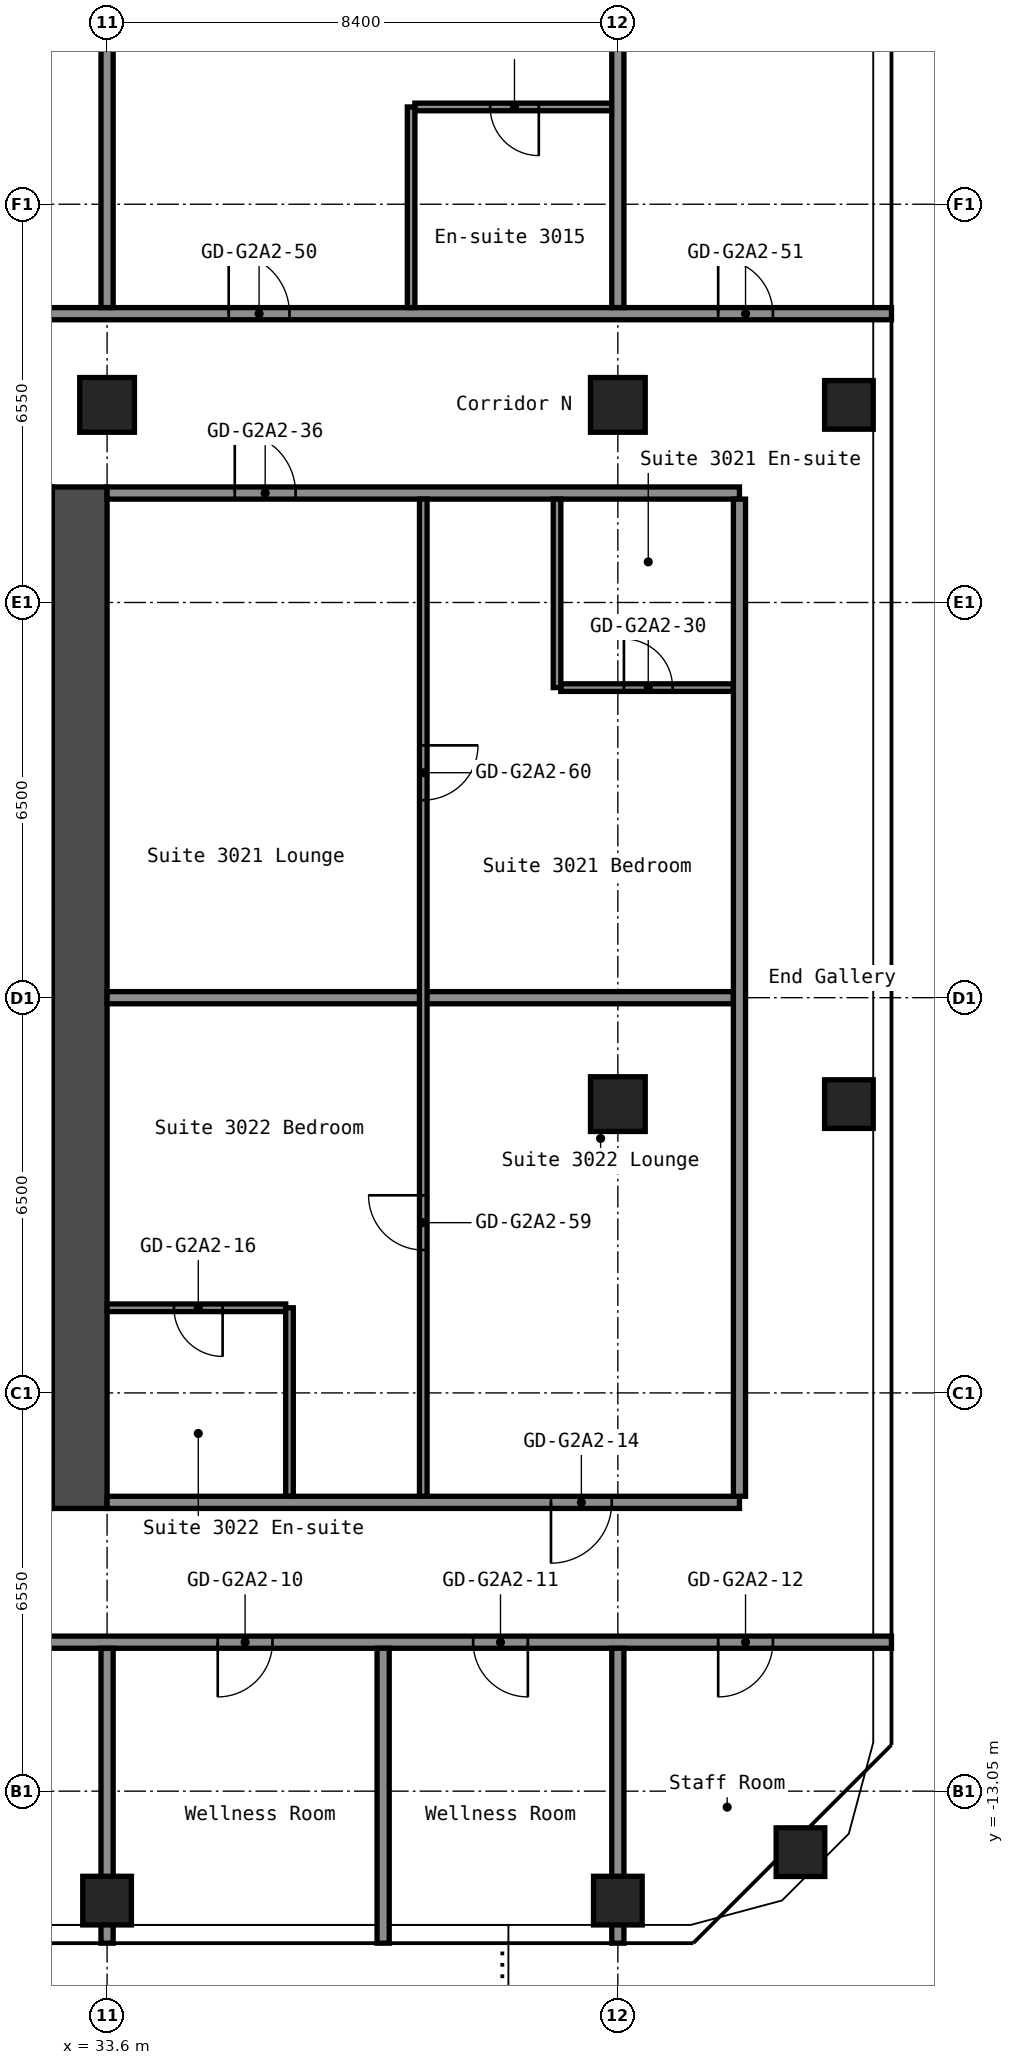
"""IFC4 building model, lengths in metres.
Left out: names, types, materials, properties, quantities, classifications, styles, units other than length and angle.
Written with IfcOpenShell. Run it as: python <this file> out.ifc"""

import sys

from ifc_helpers import new_model, si_unit, direction, frame, frame_2d, origin, origin_2d, place, context, subcontext, project, spatial, rectangle, hollow_rectangle, extrude, element, fill, save


model = new_model("IFC4")
c1 = context("Model", 3, precision=1e-05, world=origin(), true_north=direction((0.0, 1.0)))
c2 = subcontext(c1, "Body", "Model", "MODEL_VIEW")
j1 = project(units=[si_unit("LENGTHUNIT", "METRE"), si_unit("PLANEANGLEUNIT", "RADIAN")], contexts=[c1])
p1 = place(None, origin())
s1 = spatial("IfcSite", under=j1, at=p1, CompositionType="ELEMENT")
p2 = place(p1, origin())
s2 = spatial("IfcBuilding", under=s1, at=p2, CompositionType="ELEMENT")
p3 = place(p2, frame((0.0, 0.0, 107.4)))
s3 = spatial("IfcBuildingStorey", under=s2, at=p3, CompositionType="ELEMENT", Elevation=107.4)
p4 = place(p3, frame((33.6, -14.85, 0.0), z_axis=(0.0, 0.0, 1.0), x_axis=(1.0, 0.0, 0.0)))
e1 = element("IfcColumn", 1, at=p4, inside=s3, PredefinedType="COLUMN", context=c2, shape_type="SweptSolid", body=[
    extrude(hollow_rectangle(XDim=0.8, YDim=0.8, WallThickness=0.032, at=origin_2d()), origin(), (0.0, 0.0, 1.0), 2.8),
])
p5 = place(p3, frame((33.6, 9.75, 0.0), z_axis=(0.0, 0.0, 1.0), x_axis=(1.0, 0.0, 0.0)))
e2 = element("IfcColumn", 2, at=p5, inside=s3, PredefinedType="COLUMN", context=c2, shape_type="SweptSolid", body=[
    extrude(hollow_rectangle(XDim=0.9, YDim=0.9, WallThickness=0.036, at=origin_2d()), origin(), (0.0, 0.0, 1.0), 2.8),
])
p6 = place(p3, frame((42.0, -14.85, 0.0), z_axis=(0.0, 0.0, 1.0), x_axis=(1.0, 0.0, 0.0)))
e3 = element("IfcColumn", 3, at=p6, inside=s3, PredefinedType="COLUMN", context=c2, shape_type="SweptSolid", body=[
    extrude(hollow_rectangle(XDim=0.8, YDim=0.8, WallThickness=0.032, at=origin_2d()), origin(), (0.0, 0.0, 1.0), 2.8),
])
for number, where, z_axis, x_axis in (
    (4, (42.0, -1.75, 0.0), (0.0, 0.0, 1.0), (1.0, 0.0, 0.0)),
    (5, (42.0, 9.75, 0.0), (0.0, 0.0, 1.0), (1.0, 0.0, 0.0)),
):
    element("IfcColumn", number, at=place(p3, frame(where, z_axis=z_axis, x_axis=x_axis)), inside=s3, PredefinedType="COLUMN", context=c2, shape_type="SweptSolid", body=[
        extrude(hollow_rectangle(XDim=0.9, YDim=0.9, WallThickness=0.036, at=origin_2d()), origin(), (0.0, 0.0, 1.0), 2.8),
    ])
for number, where, z_axis, x_axis in (
    (6, (45.003, -14.053, 0.0), (0.0, 0.0, 1.0), (1.0, 0.0, 0.0)),
    (7, (45.8, -1.75, 0.0), (0.0, 0.0, 1.0), (1.0, 0.0, 0.0)),
    (8, (45.8, 9.75, 0.0), (0.0, 0.0, 1.0), (1.0, 0.0, 0.0)),
):
    element("IfcColumn", number, at=place(p3, frame(where, z_axis=z_axis, x_axis=x_axis)), inside=s3, PredefinedType="COLUMN", context=c2, shape_type="SweptSolid", body=[
        extrude(hollow_rectangle(XDim=0.8, YDim=0.8, WallThickness=0.032, at=origin_2d()), origin(), (0.0, 0.0, 1.0), 2.8),
    ])
p7 = place(p3, frame((33.15, -8.4, 0.0), z_axis=(0.0, 0.0, 1.0), x_axis=(0.0, 1.0, 0.0)))
e9 = element("IfcWall", 9, at=p7, inside=s3, PredefinedType="SHEAR", context=c2, shape_type="SweptSolid", body=[
    extrude(rectangle(XDim=16.8, YDim=0.9, at=frame_2d((8.4, 0.0))), origin(), (0.0, 0.0, 1.0), 2.8),
])
p8 = place(p3, frame((16.8, -10.6, 0.0), z_axis=(0.0, 0.0, 1.0), x_axis=(1.0, 0.0, 0.0)))
e10 = element("IfcWall", 10, at=p8, inside=s3, PredefinedType="PARTITIONING", context=c2, shape_type="SweptSolid", body=[
    extrude(rectangle(XDim=29.7, YDim=0.2, at=frame_2d((14.85, 0.0))), origin(), (0.0, 0.0, 1.0), 2.8),
])
p9 = place(p8, frame((3.7, 0.0, 0.0)))
e11 = element("IfcOpeningElement", 11, at=p9, cuts=e10, PredefinedType="OPENING", context=c2, shape_type="SweptSolid", body=[
    extrude(rectangle(XDim=1.0, YDim=2.1, at=frame_2d((0.5, 1.05))), frame((0.0, 0.11, 0.0), z_axis=(0.0, -1.0, 0.0), x_axis=(1.0, 0.0, 0.0)), (0.0, 0.0, 1.0), 0.22),
])
p10 = place(p8, frame((9.545, 0.0, 0.0)))
e12 = element("IfcOpeningElement", 12, at=p10, cuts=e10, PredefinedType="OPENING", context=c2, shape_type="SweptSolid", body=[
    extrude(rectangle(XDim=0.9, YDim=2.1, at=frame_2d((0.45, 1.05))), frame((0.0, 0.11, 0.0), z_axis=(0.0, -1.0, 0.0), x_axis=(1.0, 0.0, 0.0)), (0.0, 0.0, 1.0), 0.22),
])
p11 = place(p8, frame((13.745, 0.0, 0.0)))
e13 = element("IfcOpeningElement", 13, at=p11, cuts=e10, PredefinedType="OPENING", context=c2, shape_type="SweptSolid", body=[
    extrude(rectangle(XDim=0.9, YDim=2.1, at=frame_2d((0.45, 1.05))), frame((0.0, 0.11, 0.0), z_axis=(0.0, -1.0, 0.0), x_axis=(1.0, 0.0, 0.0)), (0.0, 0.0, 1.0), 0.22),
])
p12 = place(p8, frame((18.62, 0.0, 0.0)))
e14 = element("IfcOpeningElement", 14, at=p12, cuts=e10, PredefinedType="OPENING", context=c2, shape_type="SweptSolid", body=[
    extrude(rectangle(XDim=0.9, YDim=2.1, at=frame_2d((0.45, 1.05))), frame((0.0, 0.11, 0.0), z_axis=(0.0, -1.0, 0.0), x_axis=(1.0, 0.0, 0.0)), (0.0, 0.0, 1.0), 0.22),
])
p13 = place(p8, frame((22.82, 0.0, 0.0)))
e15 = element("IfcOpeningElement", 15, at=p13, cuts=e10, PredefinedType="OPENING", context=c2, shape_type="SweptSolid", body=[
    extrude(rectangle(XDim=0.9, YDim=2.1, at=frame_2d((0.45, 1.05))), frame((0.0, 0.11, 0.0), z_axis=(0.0, -1.0, 0.0), x_axis=(1.0, 0.0, 0.0)), (0.0, 0.0, 1.0), 0.22),
])
p14 = place(p8, frame((26.85, 0.0, 0.0)))
e16 = element("IfcOpeningElement", 16, at=p14, cuts=e10, PredefinedType="OPENING", context=c2, shape_type="SweptSolid", body=[
    extrude(rectangle(XDim=0.9, YDim=2.1, at=frame_2d((0.45, 1.05))), frame((0.0, 0.11, 0.0), z_axis=(0.0, -1.0, 0.0), x_axis=(1.0, 0.0, 0.0)), (0.0, 0.0, 1.0), 0.22),
])
p15 = place(p3, frame((33.6, -8.3, 0.0), z_axis=(0.0, 0.0, 1.0), x_axis=(1.0, 0.0, 0.0)))
e17 = element("IfcWall", 17, at=p15, inside=s3, PredefinedType="PARTITIONING", context=c2, shape_type="SweptSolid", body=[
    extrude(rectangle(XDim=10.4, YDim=0.2, at=frame_2d((5.2, 0.0))), origin(), (0.0, 0.0, 1.0), 2.8),
])
p16 = place(p15, frame((7.3, 0.0, 0.0)))
e18 = element("IfcOpeningElement", 18, at=p16, cuts=e17, PredefinedType="OPENING", context=c2, shape_type="SweptSolid", body=[
    extrude(rectangle(XDim=1.0, YDim=2.1, at=frame_2d((0.5, 1.05))), frame((0.0, 0.11, 0.0), z_axis=(0.0, -1.0, 0.0), x_axis=(1.0, 0.0, 0.0)), (0.0, 0.0, 1.0), 0.22),
])
p17 = place(p3, frame((33.6, -5.1, 0.0), z_axis=(0.0, 0.0, 1.0), x_axis=(1.0, 0.0, 0.0)))
e19 = element("IfcWall", 19, at=p17, inside=s3, PredefinedType="PARTITIONING", context=c2, shape_type="SweptSolid", body=[
    extrude(rectangle(XDim=2.938, YDim=0.125, at=frame_2d((1.469, 0.0))), origin(), (0.0, 0.0, 1.0), 2.8),
])
p18 = place(p17, frame((1.1, 0.0, 0.0)))
e20 = element("IfcOpeningElement", 20, at=p18, cuts=e19, PredefinedType="OPENING", context=c2, shape_type="SweptSolid", body=[
    extrude(rectangle(XDim=0.8, YDim=2.1, at=frame_2d((0.4, 1.05))), frame((0.0, 0.073, 0.0), z_axis=(0.0, -1.0, 0.0), x_axis=(1.0, 0.0, 0.0)), (0.0, 0.0, 1.0), 0.145),
])
p19 = place(p3, frame((33.6, 0.0, 0.0), z_axis=(0.0, 0.0, 1.0), x_axis=(1.0, 0.0, 0.0)))
e21 = element("IfcWall", 21, at=p19, inside=s3, PredefinedType="PARTITIONING", context=c2, shape_type="SweptSolid", body=[
    extrude(rectangle(XDim=10.3, YDim=0.2, at=frame_2d((5.15, 0.0))), origin(), (0.0, 0.0, 1.0), 2.8),
])
p20 = place(p3, frame((41.062, 5.1, 0.0), z_axis=(0.0, 0.0, 1.0), x_axis=(1.0, 0.0, 0.0)))
e22 = element("IfcWall", 22, at=p20, inside=s3, PredefinedType="PARTITIONING", context=c2, shape_type="SweptSolid", body=[
    extrude(rectangle(XDim=2.837, YDim=0.125, at=frame_2d((1.419, 0.0))), origin(), (0.0, 0.0, 1.0), 2.8),
])
p21 = place(p20, frame((1.038, 0.0, 0.0)))
e23 = element("IfcOpeningElement", 23, at=p21, cuts=e22, PredefinedType="OPENING", context=c2, shape_type="SweptSolid", body=[
    extrude(rectangle(XDim=0.8, YDim=2.1, at=frame_2d((0.4, 1.05))), frame((0.0, 0.073, 0.0), z_axis=(0.0, -1.0, 0.0), x_axis=(1.0, 0.0, 0.0)), (0.0, 0.0, 1.0), 0.145),
])
p22 = place(p3, frame((33.6, 8.3, 0.0), z_axis=(0.0, 0.0, 1.0), x_axis=(1.0, 0.0, 0.0)))
e24 = element("IfcWall", 24, at=p22, inside=s3, PredefinedType="PARTITIONING", context=c2, shape_type="SweptSolid", body=[
    extrude(rectangle(XDim=10.4, YDim=0.2, at=frame_2d((5.2, 0.0))), origin(), (0.0, 0.0, 1.0), 2.8),
])
p23 = place(p22, frame((2.1, 0.0, 0.0)))
e25 = element("IfcOpeningElement", 25, at=p23, cuts=e24, PredefinedType="OPENING", context=c2, shape_type="SweptSolid", body=[
    extrude(rectangle(XDim=1.0, YDim=2.1, at=frame_2d((0.5, 1.05))), frame((0.0, 0.11, 0.0), z_axis=(0.0, -1.0, 0.0), x_axis=(1.0, 0.0, 0.0)), (0.0, 0.0, 1.0), 0.22),
])
p24 = place(p3, frame((16.8, 11.25, 0.0), z_axis=(0.0, 0.0, 1.0), x_axis=(1.0, 0.0, 0.0)))
e26 = element("IfcWall", 26, at=p24, inside=s3, PredefinedType="PARTITIONING", context=c2, shape_type="SweptSolid", body=[
    extrude(rectangle(XDim=29.7, YDim=0.2, at=frame_2d((14.85, 0.0))), origin(), (0.0, 0.0, 1.0), 2.8),
])
p25 = place(p24, frame((2.0, 0.0, 0.0)))
e27 = element("IfcOpeningElement", 27, at=p25, cuts=e26, PredefinedType="OPENING", context=c2, shape_type="SweptSolid", body=[
    extrude(rectangle(XDim=1.0, YDim=2.1, at=frame_2d((0.5, 1.05))), frame((0.0, 0.11, 0.0), z_axis=(0.0, -1.0, 0.0), x_axis=(1.0, 0.0, 0.0)), (0.0, 0.0, 1.0), 0.22),
])
p26 = place(p24, frame((13.8, 0.0, 0.0)))
e28 = element("IfcOpeningElement", 28, at=p26, cuts=e26, PredefinedType="OPENING", context=c2, shape_type="SweptSolid", body=[
    extrude(rectangle(XDim=1.0, YDim=2.1, at=frame_2d((0.5, 1.05))), frame((0.0, 0.11, 0.0), z_axis=(0.0, -1.0, 0.0), x_axis=(1.0, 0.0, 0.0)), (0.0, 0.0, 1.0), 0.22),
])
p27 = place(p24, frame((18.8, 0.0, 0.0)))
e29 = element("IfcOpeningElement", 29, at=p27, cuts=e26, PredefinedType="OPENING", context=c2, shape_type="SweptSolid", body=[
    extrude(rectangle(XDim=1.0, YDim=2.1, at=frame_2d((0.5, 1.05))), frame((0.0, 0.11, 0.0), z_axis=(0.0, -1.0, 0.0), x_axis=(1.0, 0.0, 0.0)), (0.0, 0.0, 1.0), 0.22),
])
p28 = place(p24, frame((26.85, 0.0, 0.0)))
e30 = element("IfcOpeningElement", 30, at=p28, cuts=e26, PredefinedType="OPENING", context=c2, shape_type="SweptSolid", body=[
    extrude(rectangle(XDim=0.9, YDim=2.1, at=frame_2d((0.45, 1.05))), frame((0.0, 0.11, 0.0), z_axis=(0.0, -1.0, 0.0), x_axis=(1.0, 0.0, 0.0)), (0.0, 0.0, 1.0), 0.22),
])
p29 = place(p3, frame((38.663, 14.65, 0.0), z_axis=(0.0, 0.0, 1.0), x_axis=(1.0, 0.0, 0.0)))
e31 = element("IfcWall", 31, at=p29, inside=s3, PredefinedType="PARTITIONING", context=c2, shape_type="SweptSolid", body=[
    extrude(rectangle(XDim=3.237, YDim=0.125, at=frame_2d((1.619, 0.0))), origin(), (0.0, 0.0, 1.0), 2.8),
])
p30 = place(p29, frame((1.238, 0.0, 0.0)))
e32 = element("IfcOpeningElement", 32, at=p30, cuts=e31, PredefinedType="OPENING", context=c2, shape_type="SweptSolid", body=[
    extrude(rectangle(XDim=0.8, YDim=2.1, at=frame_2d((0.4, 1.05))), frame((0.0, 0.073, 0.0), z_axis=(0.0, -1.0, 0.0), x_axis=(1.0, 0.0, 0.0)), (0.0, 0.0, 1.0), 0.145),
])
p31 = place(p3, frame((33.6, -15.55, 0.0), z_axis=(0.0, 0.0, 1.0), x_axis=(0.0, 1.0, 0.0)))
e33 = element("IfcWall", 33, at=p31, inside=s3, PredefinedType="PARTITIONING", context=c2, shape_type="SweptSolid", body=[
    extrude(rectangle(XDim=4.85, YDim=0.2, at=frame_2d((2.425, 0.0))), origin(), (0.0, 0.0, 1.0), 2.8),
])
p32 = place(p3, frame((33.6, 11.35, 0.0), z_axis=(0.0, 0.0, 1.0), x_axis=(0.0, 1.0, 0.0)))
e34 = element("IfcWall", 34, at=p32, inside=s3, PredefinedType="PARTITIONING", context=c2, shape_type="SweptSolid", body=[
    extrude(rectangle(XDim=12.2, YDim=0.2, at=frame_2d((6.1, 0.0))), origin(), (0.0, 0.0, 1.0), 2.8),
])
p33 = place(p3, frame((36.6, -8.2, 0.0), z_axis=(0.0, 0.0, 1.0), x_axis=(0.0, 1.0, 0.0)))
e35 = element("IfcWall", 35, at=p33, inside=s3, PredefinedType="PARTITIONING", context=c2, shape_type="SweptSolid", body=[
    extrude(rectangle(XDim=3.1, YDim=0.125, at=frame_2d((1.55, 0.0))), origin(), (0.0, 0.0, 1.0), 2.8),
])
p34 = place(p3, frame((38.14, -15.55, 0.0), z_axis=(0.0, 0.0, 1.0), x_axis=(0.0, 1.0, 0.0)))
e36 = element("IfcWall", 36, at=p34, inside=s3, PredefinedType="PARTITIONING", context=c2, shape_type="SweptSolid", body=[
    extrude(rectangle(XDim=4.85, YDim=0.2, at=frame_2d((2.425, 0.0))), origin(), (0.0, 0.0, 1.0), 2.8),
])
p35 = place(p3, frame((38.6, 11.35, 0.0), z_axis=(0.0, 0.0, 1.0), x_axis=(0.0, 1.0, 0.0)))
e37 = element("IfcWall", 37, at=p35, inside=s3, PredefinedType="PARTITIONING", context=c2, shape_type="SweptSolid", body=[
    extrude(rectangle(XDim=3.3, YDim=0.125, at=frame_2d((1.65, 0.0))), origin(), (0.0, 0.0, 1.0), 2.8),
])
p36 = place(p3, frame((38.8, -8.2, 0.0), z_axis=(0.0, 0.0, 1.0), x_axis=(0.0, 1.0, 0.0)))
e38 = element("IfcWall", 38, at=p36, inside=s3, PredefinedType="PARTITIONING", context=c2, shape_type="SweptSolid", body=[
    extrude(rectangle(XDim=16.4, YDim=0.125, at=frame_2d((8.2, 0.0))), origin(), (0.0, 0.0, 1.0), 2.8),
])
p37 = place(p36, frame((4.05, 0.0, 0.0)))
e39 = element("IfcOpeningElement", 39, at=p37, cuts=e38, PredefinedType="OPENING", context=c2, shape_type="SweptSolid", body=[
    extrude(rectangle(XDim=0.9, YDim=2.1, at=frame_2d((0.45, 1.05))), frame((0.0, 0.073, 0.0), z_axis=(0.0, -1.0, 0.0), x_axis=(1.0, 0.0, 0.0)), (0.0, 0.0, 1.0), 0.145),
])
p38 = place(p36, frame((11.45, 0.0, 0.0)))
e40 = element("IfcOpeningElement", 40, at=p38, cuts=e38, PredefinedType="OPENING", context=c2, shape_type="SweptSolid", body=[
    extrude(rectangle(XDim=0.9, YDim=2.1, at=frame_2d((0.45, 1.05))), frame((0.0, 0.073, 0.0), z_axis=(0.0, -1.0, 0.0), x_axis=(1.0, 0.0, 0.0)), (0.0, 0.0, 1.0), 0.145),
])
p39 = place(p3, frame((41.0, 5.1, 0.0), z_axis=(0.0, 0.0, 1.0), x_axis=(0.0, 1.0, 0.0)))
e41 = element("IfcWall", 41, at=p39, inside=s3, PredefinedType="PARTITIONING", context=c2, shape_type="SweptSolid", body=[
    extrude(rectangle(XDim=3.1, YDim=0.125, at=frame_2d((1.55, 0.0))), origin(), (0.0, 0.0, 1.0), 2.8),
])
p40 = place(p3, frame((42.0, -15.55, 0.0), z_axis=(0.0, 0.0, 1.0), x_axis=(0.0, 1.0, 0.0)))
e42 = element("IfcWall", 42, at=p40, inside=s3, PredefinedType="PARTITIONING", context=c2, shape_type="SweptSolid", body=[
    extrude(rectangle(XDim=4.85, YDim=0.2, at=frame_2d((2.425, 0.0))), origin(), (0.0, 0.0, 1.0), 2.8),
])
p41 = place(p3, frame((42.0, 11.35, 0.0), z_axis=(0.0, 0.0, 1.0), x_axis=(0.0, 1.0, 0.0)))
e43 = element("IfcWall", 43, at=p41, inside=s3, PredefinedType="PARTITIONING", context=c2, shape_type="SweptSolid", body=[
    extrude(rectangle(XDim=12.2, YDim=0.2, at=frame_2d((6.1, 0.0))), origin(), (0.0, 0.0, 1.0), 2.8),
])
p42 = place(p3, frame((44.0, -8.2, 0.0), z_axis=(0.0, 0.0, 1.0), x_axis=(0.0, 1.0, 0.0)))
e44 = element("IfcWall", 44, at=p42, inside=s3, PredefinedType="PARTITIONING", context=c2, shape_type="SweptSolid", body=[
    extrude(rectangle(XDim=16.4, YDim=0.2, at=frame_2d((8.2, 0.0))), origin(), (0.0, 0.0, 1.0), 2.8),
])
p43 = place(p12, origin())
e45 = element("IfcDoor", 45, at=p43, inside=s3, OperationType="SINGLE_SWING_LEFT", PredefinedType="DOOR", context=c2, shape_type="SweptSolid", body=[
    extrude(rectangle(XDim=0.9, YDim=2.1, at=frame_2d((0.45, 1.05))), frame((0.0, 0.025, 0.0), z_axis=(0.0, -1.0, 0.0), x_axis=(1.0, 0.0, 0.0)), (0.0, 0.0, 1.0), 0.05),
])
fill(e14, e45)
p44 = place(p13, origin())
e46 = element("IfcDoor", 46, at=p44, inside=s3, OperationType="SINGLE_SWING_RIGHT", PredefinedType="DOOR", context=c2, shape_type="SweptSolid", body=[
    extrude(rectangle(XDim=0.9, YDim=2.1, at=frame_2d((0.45, 1.05))), frame((0.0, 0.025, 0.0), z_axis=(0.0, -1.0, 0.0), x_axis=(1.0, 0.0, 0.0)), (0.0, 0.0, 1.0), 0.05),
])
fill(e15, e46)
p45 = place(p14, origin())
e47 = element("IfcDoor", 47, at=p45, inside=s3, OperationType="SINGLE_SWING_LEFT", PredefinedType="DOOR", context=c2, shape_type="SweptSolid", body=[
    extrude(rectangle(XDim=0.9, YDim=2.1, at=frame_2d((0.45, 1.05))), frame((0.0, 0.025, 0.0), z_axis=(0.0, -1.0, 0.0), x_axis=(1.0, 0.0, 0.0)), (0.0, 0.0, 1.0), 0.05),
])
fill(e16, e47)
p46 = place(p16, origin())
e48 = element("IfcDoor", 48, at=p46, inside=s3, OperationType="SINGLE_SWING_LEFT", PredefinedType="DOOR", context=c2, shape_type="SweptSolid", body=[
    extrude(rectangle(XDim=1.0, YDim=2.1, at=frame_2d((0.5, 1.05))), frame((0.0, 0.025, 0.0), z_axis=(0.0, -1.0, 0.0), x_axis=(1.0, 0.0, 0.0)), (0.0, 0.0, 1.0), 0.05),
])
fill(e18, e48)
p47 = place(p18, origin())
e49 = element("IfcDoor", 49, at=p47, inside=s3, OperationType="SINGLE_SWING_RIGHT", PredefinedType="DOOR", context=c2, shape_type="SweptSolid", body=[
    extrude(rectangle(XDim=0.8, YDim=2.1, at=frame_2d((0.4, 1.05))), frame((0.0, 0.025, 0.0), z_axis=(0.0, -1.0, 0.0), x_axis=(1.0, 0.0, 0.0)), (0.0, 0.0, 1.0), 0.05),
])
fill(e20, e49)
p48 = place(p21, origin())
e50 = element("IfcDoor", 50, at=p48, inside=s3, OperationType="SINGLE_SWING_RIGHT", PredefinedType="DOOR", context=c2, shape_type="SweptSolid", body=[
    extrude(rectangle(XDim=0.8, YDim=2.1, at=frame_2d((0.4, 1.05))), frame((0.0, 0.025, 0.0), z_axis=(0.0, -1.0, 0.0), x_axis=(1.0, 0.0, 0.0)), (0.0, 0.0, 1.0), 0.05),
])
fill(e23, e50)
p49 = place(p23, origin())
e51 = element("IfcDoor", 51, at=p49, inside=s3, OperationType="SINGLE_SWING_RIGHT", PredefinedType="DOOR", context=c2, shape_type="SweptSolid", body=[
    extrude(rectangle(XDim=1.0, YDim=2.1, at=frame_2d((0.5, 1.05))), frame((0.0, 0.025, 0.0), z_axis=(0.0, -1.0, 0.0), x_axis=(1.0, 0.0, 0.0)), (0.0, 0.0, 1.0), 0.05),
])
fill(e25, e51)
p50 = place(p27, origin())
e52 = element("IfcDoor", 52, at=p50, inside=s3, OperationType="SINGLE_SWING_RIGHT", PredefinedType="DOOR", context=c2, shape_type="SweptSolid", body=[
    extrude(rectangle(XDim=1.0, YDim=2.1, at=frame_2d((0.5, 1.05))), frame((0.0, 0.025, 0.0), z_axis=(0.0, -1.0, 0.0), x_axis=(1.0, 0.0, 0.0)), (0.0, 0.0, 1.0), 0.05),
])
fill(e29, e52)
p51 = place(p28, origin())
e53 = element("IfcDoor", 53, at=p51, inside=s3, OperationType="SINGLE_SWING_RIGHT", PredefinedType="DOOR", context=c2, shape_type="SweptSolid", body=[
    extrude(rectangle(XDim=0.9, YDim=2.1, at=frame_2d((0.45, 1.05))), frame((0.0, 0.025, 0.0), z_axis=(0.0, -1.0, 0.0), x_axis=(1.0, 0.0, 0.0)), (0.0, 0.0, 1.0), 0.05),
])
fill(e30, e53)
p52 = place(p30, origin())
e54 = element("IfcDoor", 54, at=p52, inside=s3, OperationType="SINGLE_SWING_RIGHT", PredefinedType="DOOR", context=c2, shape_type="SweptSolid", body=[
    extrude(rectangle(XDim=0.8, YDim=2.1, at=frame_2d((0.4, 1.05))), frame((0.0, 0.025, 0.0), z_axis=(0.0, -1.0, 0.0), x_axis=(1.0, 0.0, 0.0)), (0.0, 0.0, 1.0), 0.05),
])
fill(e32, e54)
p53 = place(p37, origin())
e55 = element("IfcDoor", 55, at=p53, inside=s3, OperationType="SINGLE_SWING_LEFT", PredefinedType="DOOR", context=c2, shape_type="SweptSolid", body=[
    extrude(rectangle(XDim=0.9, YDim=2.1, at=frame_2d((0.45, 1.05))), frame((0.0, 0.025, 0.0), z_axis=(0.0, -1.0, 0.0), x_axis=(1.0, 0.0, 0.0)), (0.0, 0.0, 1.0), 0.05),
])
fill(e39, e55)
p54 = place(p38, origin())
e56 = element("IfcDoor", 56, at=p54, inside=s3, OperationType="SINGLE_SWING_RIGHT", PredefinedType="DOOR", context=c2, shape_type="SweptSolid", body=[
    extrude(rectangle(XDim=0.9, YDim=2.1, at=frame_2d((0.45, 1.05))), frame((0.0, 0.025, 0.0), z_axis=(0.0, -1.0, 0.0), x_axis=(1.0, 0.0, 0.0)), (0.0, 0.0, 1.0), 0.05),
])
fill(e40, e56)
save(model, sys.argv[1])
